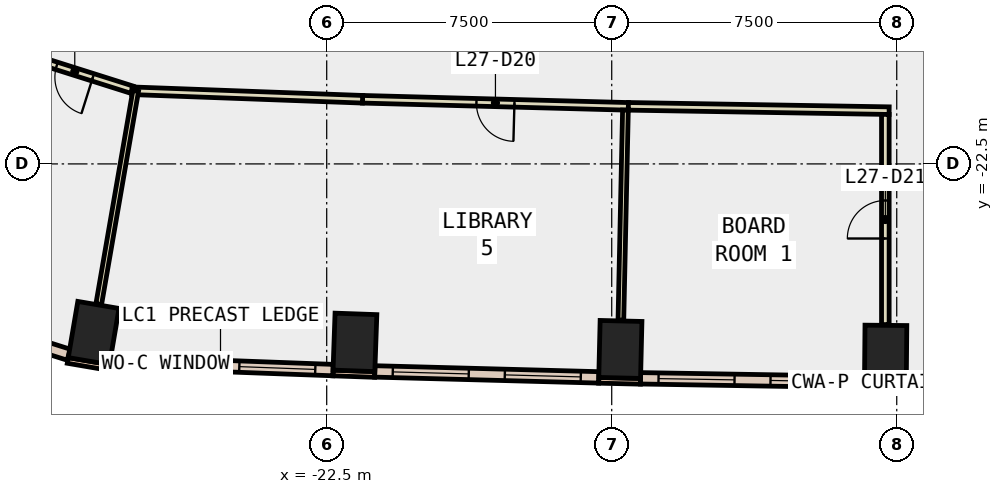
"""IFC4 building model, lengths in metres.
Left out: names, types, materials, properties, quantities, classifications, styles, units other than length and angle.
Written with IfcOpenShell. Run it as: python <this file> out.ifc"""

import sys

from ifc_helpers import new_model, si_unit, direction, frame, frame_2d, origin, origin_2d, place, context, subcontext, project, spatial, rectangle, extrude, element, fill, save


model = new_model("IFC4")
c1 = context("Model", 3, precision=1e-05, world=origin(), true_north=direction((0.0, 1.0)))
c2 = subcontext(c1, "Body", "Model", "MODEL_VIEW")
j1 = project(units=[si_unit("LENGTHUNIT", "METRE"), si_unit("PLANEANGLEUNIT", "RADIAN")], contexts=[c1])
p1 = place(None, origin())
s1 = spatial("IfcSite", under=j1, at=p1, CompositionType="ELEMENT")
p2 = place(p1, origin())
s2 = spatial("IfcBuilding", under=s1, at=p2, CompositionType="ELEMENT")
p3 = place(p2, frame((0.0, 0.0, 124.4)))
s3 = spatial("IfcBuildingStorey", under=s2, at=p3, CompositionType="ELEMENT", Elevation=124.4)
for number, where, z_axis, x_axis in (
    (1, (-28.633, -26.95, -0.4), (0.0, 0.0, 1.0), (-0.986, 0.168, 0.0)),
    (2, (-21.757, -27.196, -0.4), (0.0, 0.0, 1.0), (-0.999, 0.035, 0.0)),
    (3, (-14.773, -27.382, -0.4), (0.0, 0.0, 1.0), (-1.0, 0.024, 0.0)),
    (4, (-7.792, -27.498, -0.4), (0.0, 0.0, 1.0), (-1.0, 0.009, 0.0)),
):
    element("IfcColumn", number, at=place(p3, frame(where, z_axis=z_axis, x_axis=x_axis)), inside=s3, PredefinedType="COLUMN", context=c2, shape_type="SweptSolid", body=[
        extrude(rectangle(XDim=1.1, YDim=1.5, at=origin_2d()), origin(), (0.0, 0.0, 1.0), 4.2),
    ])
p4 = place(p3, frame((-29.314, -27.671, 0.0), z_axis=(0.0, 0.0, 1.0), x_axis=(0.985763338892, -0.168138751323, 0.0)))
e5 = element("IfcWall", 5, at=p4, inside=s3, PredefinedType="STANDARD", context=c2, shape_type="SweptSolid", body=[
    extrude(rectangle(XDim=1.101, YDim=0.15, at=frame_2d((0.55, 0.0))), origin(), (0.0, 0.0, 1.0), 3.8),
])
p5 = place(p3, frame((-22.336, -28.001, 0.0), z_axis=(0.0, 0.0, 1.0), x_axis=(0.999368780235, -0.035525217693, 0.0)))
e6 = element("IfcWall", 6, at=p5, inside=s3, PredefinedType="STANDARD", context=c2, shape_type="SweptSolid", body=[
    extrude(rectangle(XDim=1.1, YDim=0.15, at=frame_2d((0.55, 0.0))), origin(), (0.0, 0.0, 1.0), 3.8),
])
p6 = place(p3, frame((-15.343, -28.194, 0.0), z_axis=(0.0, 0.0, 1.0), x_axis=(0.999723421029, -0.023517683673, 0.0)))
e7 = element("IfcWall", 7, at=p6, inside=s3, PredefinedType="STANDARD", context=c2, shape_type="SweptSolid", body=[
    extrude(rectangle(XDim=1.1, YDim=0.15, at=frame_2d((0.55, 0.0))), origin(), (0.0, 0.0, 1.0), 3.8),
])
p7 = place(p3, frame((-8.349, -28.318, 0.0), z_axis=(0.0, 0.0, 1.0), x_axis=(0.999960601295, -0.008876703074, 0.0)))
e8 = element("IfcWall", 8, at=p7, inside=s3, PredefinedType="STANDARD", context=c2, shape_type="SweptSolid", body=[
    extrude(rectangle(XDim=1.1, YDim=0.15, at=frame_2d((0.55, 0.0))), origin(), (0.0, 0.0, 1.0), 3.8),
])
p8 = place(p3, frame((-28.205, -27.708, 0.0), z_axis=(0.0, 0.0, 1.0), x_axis=(0.999317846462, -0.036930228031, 0.0)))
e9 = element("IfcWall", 9, at=p8, inside=s3, PredefinedType="STANDARD", context=c2, shape_type="SweptSolid", body=[
    extrude(rectangle(XDim=5.877, YDim=0.3, at=frame_2d((2.938, 0.0))), origin(), (0.0, 0.0, 1.0), 3.8),
])
p9 = place(p8, frame((0.469, 0.0, 0.9)))
e10 = element("IfcOpeningElement", 10, at=p9, cuts=e9, PredefinedType="OPENING", context=c2, shape_type="SweptSolid", body=[
    extrude(rectangle(XDim=2.0, YDim=2.6, at=frame_2d((1.0, 1.3))), frame((0.0, 0.16, 0.0), z_axis=(0.0, -1.0, 0.0), x_axis=(1.0, 0.0, 0.0)), (0.0, 0.0, 1.0), 0.32),
])
p10 = place(p8, frame((3.408, 0.0, 0.9)))
e11 = element("IfcOpeningElement", 11, at=p10, cuts=e9, PredefinedType="OPENING", context=c2, shape_type="SweptSolid", body=[
    extrude(rectangle(XDim=2.0, YDim=2.6, at=frame_2d((1.0, 1.3))), frame((0.0, 0.16, 0.0), z_axis=(0.0, -1.0, 0.0), x_axis=(1.0, 0.0, 0.0)), (0.0, 0.0, 1.0), 0.32),
])
p11 = place(p3, frame((-21.235, -27.96, 0.0), z_axis=(0.0, 0.0, 1.0), x_axis=(0.999645618819, -0.026620232457, 0.0)))
e12 = element("IfcWall", 12, at=p11, inside=s3, PredefinedType="STANDARD", context=c2, shape_type="SweptSolid", body=[
    extrude(rectangle(XDim=5.897, YDim=0.3, at=frame_2d((2.949, 0.0))), origin(), (0.0, 0.0, 1.0), 3.8),
])
p12 = place(p11, frame((0.474, 0.0, 0.9)))
e13 = element("IfcOpeningElement", 13, at=p12, cuts=e12, PredefinedType="OPENING", context=c2, shape_type="SweptSolid", body=[
    extrude(rectangle(XDim=2.0, YDim=2.6, at=frame_2d((1.0, 1.3))), frame((0.0, 0.16, 0.0), z_axis=(0.0, -1.0, 0.0), x_axis=(1.0, 0.0, 0.0)), (0.0, 0.0, 1.0), 0.32),
])
p13 = place(p11, frame((3.423, 0.0, 0.9)))
e14 = element("IfcOpeningElement", 14, at=p13, cuts=e12, PredefinedType="OPENING", context=c2, shape_type="SweptSolid", body=[
    extrude(rectangle(XDim=2.0, YDim=2.6, at=frame_2d((1.0, 1.3))), frame((0.0, 0.16, 0.0), z_axis=(0.0, -1.0, 0.0), x_axis=(1.0, 0.0, 0.0)), (0.0, 0.0, 1.0), 0.32),
])
p14 = place(p3, frame((-14.242, -28.141, 0.0), z_axis=(0.0, 0.0, 1.0), x_axis=(0.999862081538, -0.016607766328, 0.0)))
e15 = element("IfcWall", 15, at=p14, inside=s3, PredefinedType="STANDARD", context=c2, shape_type="SweptSolid", body=[
    extrude(rectangle(XDim=5.895, YDim=0.3, at=frame_2d((2.947, 0.0))), origin(), (0.0, 0.0, 1.0), 3.8),
])
p15 = place(p14, frame((0.474, 0.0, 0.9)))
e16 = element("IfcOpeningElement", 16, at=p15, cuts=e15, PredefinedType="OPENING", context=c2, shape_type="SweptSolid", body=[
    extrude(rectangle(XDim=2.0, YDim=2.6, at=frame_2d((1.0, 1.3))), frame((0.0, 0.16, 0.0), z_axis=(0.0, -1.0, 0.0), x_axis=(1.0, 0.0, 0.0)), (0.0, 0.0, 1.0), 0.32),
])
p16 = place(p14, frame((3.421, 0.0, 0.9)))
e17 = element("IfcOpeningElement", 17, at=p16, cuts=e15, PredefinedType="OPENING", context=c2, shape_type="SweptSolid", body=[
    extrude(rectangle(XDim=2.0, YDim=2.6, at=frame_2d((1.0, 1.3))), frame((0.0, 0.16, 0.0), z_axis=(0.0, -1.0, 0.0), x_axis=(1.0, 0.0, 0.0)), (0.0, 0.0, 1.0), 0.32),
])
p17 = place(p3, frame((-33.657, -26.139, 0.0), z_axis=(0.0, 0.0, 1.0), x_axis=(0.953449736988, -0.301551983971, 0.0)))
e18 = element("IfcWall", 18, at=p17, inside=s3, PredefinedType="STANDARD", context=c2, shape_type="SweptSolid", body=[
    extrude(rectangle(XDim=4.583, YDim=0.3, at=frame_2d((2.292, 0.0))), origin(), (0.0, 0.0, 1.0), 3.8),
])
p18 = place(p17, frame((1.592, 0.0, 0.9)))
e19 = element("IfcOpeningElement", 19, at=p18, cuts=e18, PredefinedType="OPENING", context=c2, shape_type="SweptSolid", body=[
    extrude(rectangle(XDim=1.4, YDim=2.6, at=frame_2d((0.7, 1.3))), frame((0.0, 0.16, 0.0), z_axis=(0.0, -1.0, 0.0), x_axis=(1.0, 0.0, 0.0)), (0.0, 0.0, 1.0), 0.32),
])
p19 = place(p3, frame((-27.621, -20.548, 0.0), z_axis=(0.0, 0.0, 1.0), x_axis=(-0.953482354465, 0.301448834338, 0.0)))
e20 = element("IfcWall", 20, at=p19, inside=s3, PredefinedType="PARTITIONING", context=c2, shape_type="SweptSolid", body=[
    extrude(rectangle(XDim=3.165, YDim=0.2, at=frame_2d((1.583, 0.0))), origin(), (0.0, 0.0, 1.0), 3.8),
])
p20 = place(p19, frame((1.082, 0.0, 0.0)))
e21 = element("IfcOpeningElement", 21, at=p20, cuts=e20, PredefinedType="OPENING", context=c2, shape_type="SweptSolid", body=[
    extrude(rectangle(XDim=1.0, YDim=2.1, at=frame_2d((0.5, 1.05))), frame((0.0, 0.11, 0.0), z_axis=(0.0, -1.0, 0.0), x_axis=(1.0, 0.0, 0.0)), (0.0, 0.0, 1.0), 0.22),
])
p21 = place(p3, frame((-14.562, -20.986, 0.0), z_axis=(0.0, 0.0, 1.0), x_axis=(-0.999642796892, 0.026725991498, 0.0)))
e22 = element("IfcWall", 22, at=p21, inside=s3, PredefinedType="PARTITIONING", context=c2, shape_type="SweptSolid", body=[
    extrude(rectangle(XDim=6.997, YDim=0.2, at=frame_2d((3.499, 0.0))), origin(), (0.0, 0.0, 1.0), 3.8),
])
p22 = place(p21, frame((2.999, 0.0, 0.0)))
e23 = element("IfcOpeningElement", 23, at=p22, cuts=e22, PredefinedType="OPENING", context=c2, shape_type="SweptSolid", body=[
    extrude(rectangle(XDim=1.0, YDim=2.1, at=frame_2d((0.5, 1.05))), frame((0.0, 0.11, 0.0), z_axis=(0.0, -1.0, 0.0), x_axis=(1.0, 0.0, 0.0)), (0.0, 0.0, 1.0), 0.22),
])
p23 = place(p3, frame((-21.557, -20.799, 0.0), z_axis=(0.0, 0.0, 1.0), x_axis=(-0.99931884782, 0.036903121698, 0.0)))
e24 = element("IfcWall", 24, at=p23, inside=s3, PredefinedType="PARTITIONING", context=c2, shape_type="SweptSolid", body=[
    extrude(rectangle(XDim=6.073, YDim=0.2, at=frame_2d((3.037, 0.0))), origin(), (0.0, 0.0, 1.0), 3.8),
])
p24 = place(p3, frame((-7.7, -21.099, 0.0), z_axis=(0.0, 0.0, 1.0), x_axis=(-0.999861998162, 0.016612785183, 0.0)))
e25 = element("IfcWall", 25, at=p24, inside=s3, PredefinedType="PARTITIONING", context=c2, shape_type="SweptSolid", body=[
    extrude(rectangle(XDim=6.863, YDim=0.2, at=frame_2d((3.432, 0.0))), origin(), (0.0, 0.0, 1.0), 3.8),
])
p25 = place(p3, frame((-7.8, -26.728, 0.0), z_axis=(0.0, 0.0, 1.0), x_axis=(0.0, 1.0, 0.0)))
e26 = element("IfcWall", 26, at=p25, inside=s3, PredefinedType="PARTITIONING", context=c2, shape_type="SweptSolid", body=[
    extrude(rectangle(XDim=5.531, YDim=0.2, at=frame_2d((2.766, 0.0))), origin(), (0.0, 0.0, 1.0), 3.8),
])
p26 = place(p25, frame((2.265, 0.0, 0.0)))
e27 = element("IfcOpeningElement", 27, at=p26, cuts=e26, PredefinedType="OPENING", context=c2, shape_type="SweptSolid", body=[
    extrude(rectangle(XDim=1.0, YDim=2.1, at=frame_2d((0.5, 1.05))), frame((0.0, 0.11, 0.0), z_axis=(0.0, -1.0, 0.0), x_axis=(1.0, 0.0, 0.0)), (0.0, 0.0, 1.0), 0.22),
])
p27 = place(p3, frame((-27.526, -20.578, 0.0), z_axis=(0.0, 0.0, 1.0), x_axis=(-0.170795043313, -0.985306578269, 0.0)))
e28 = element("IfcWall", 28, at=p27, inside=s3, PredefinedType="PARTITIONING", context=c2, shape_type="SweptSolid", body=[
    extrude(rectangle(XDim=5.698, YDim=0.15, at=frame_2d((2.849, 0.0))), origin(), (0.0, 0.0, 1.0), 3.8),
])
p28 = place(p3, frame((-14.639, -21.084, 0.0), z_axis=(0.0, 0.0, 1.0), x_axis=(-0.021723441989, -0.99976401819, 0.0)))
e29 = element("IfcWall", 29, at=p28, inside=s3, PredefinedType="PARTITIONING", context=c2, shape_type="SweptSolid", body=[
    extrude(rectangle(XDim=5.529, YDim=0.15, at=frame_2d((2.765, 0.0))), origin(), (0.0, 0.0, 1.0), 3.8),
])
p29 = place(p9, origin())
e30 = element("IfcWindow", 30, at=p29, inside=s3, PartitioningType="SINGLE_PANEL", PredefinedType="WINDOW", context=c2, shape_type="SweptSolid", body=[
    extrude(rectangle(XDim=2.0, YDim=2.6, at=frame_2d((1.0, 1.3))), frame((0.0, 0.03, 0.0), z_axis=(0.0, -1.0, 0.0), x_axis=(1.0, 0.0, 0.0)), (0.0, 0.0, 1.0), 0.06),
])
fill(e10, e30)
p30 = place(p10, origin())
e31 = element("IfcWindow", 31, at=p30, inside=s3, PartitioningType="SINGLE_PANEL", PredefinedType="WINDOW", context=c2, shape_type="SweptSolid", body=[
    extrude(rectangle(XDim=2.0, YDim=2.6, at=frame_2d((1.0, 1.3))), frame((0.0, 0.03, 0.0), z_axis=(0.0, -1.0, 0.0), x_axis=(1.0, 0.0, 0.0)), (0.0, 0.0, 1.0), 0.06),
])
fill(e11, e31)
p31 = place(p12, origin())
e32 = element("IfcWindow", 32, at=p31, inside=s3, PartitioningType="SINGLE_PANEL", PredefinedType="WINDOW", context=c2, shape_type="SweptSolid", body=[
    extrude(rectangle(XDim=2.0, YDim=2.6, at=frame_2d((1.0, 1.3))), frame((0.0, 0.03, 0.0), z_axis=(0.0, -1.0, 0.0), x_axis=(1.0, 0.0, 0.0)), (0.0, 0.0, 1.0), 0.06),
])
fill(e13, e32)
p32 = place(p13, origin())
e33 = element("IfcWindow", 33, at=p32, inside=s3, PartitioningType="SINGLE_PANEL", PredefinedType="WINDOW", context=c2, shape_type="SweptSolid", body=[
    extrude(rectangle(XDim=2.0, YDim=2.6, at=frame_2d((1.0, 1.3))), frame((0.0, 0.03, 0.0), z_axis=(0.0, -1.0, 0.0), x_axis=(1.0, 0.0, 0.0)), (0.0, 0.0, 1.0), 0.06),
])
fill(e14, e33)
p33 = place(p15, origin())
e34 = element("IfcWindow", 34, at=p33, inside=s3, PartitioningType="SINGLE_PANEL", PredefinedType="WINDOW", context=c2, shape_type="SweptSolid", body=[
    extrude(rectangle(XDim=2.0, YDim=2.6, at=frame_2d((1.0, 1.3))), frame((0.0, 0.03, 0.0), z_axis=(0.0, -1.0, 0.0), x_axis=(1.0, 0.0, 0.0)), (0.0, 0.0, 1.0), 0.06),
])
fill(e16, e34)
p34 = place(p16, origin())
e35 = element("IfcWindow", 35, at=p34, inside=s3, PartitioningType="SINGLE_PANEL", PredefinedType="WINDOW", context=c2, shape_type="SweptSolid", body=[
    extrude(rectangle(XDim=2.0, YDim=2.6, at=frame_2d((1.0, 1.3))), frame((0.0, 0.03, 0.0), z_axis=(0.0, -1.0, 0.0), x_axis=(1.0, 0.0, 0.0)), (0.0, 0.0, 1.0), 0.06),
])
fill(e17, e35)
p35 = place(p20, origin())
e36 = element("IfcDoor", 36, at=p35, inside=s3, OperationType="SINGLE_SWING_RIGHT", PredefinedType="DOOR", context=c2, shape_type="SweptSolid", body=[
    extrude(rectangle(XDim=1.0, YDim=2.1, at=frame_2d((0.5, 1.05))), frame((0.0, 0.025, 0.0), z_axis=(0.0, -1.0, 0.0), x_axis=(1.0, 0.0, 0.0)), (0.0, 0.0, 1.0), 0.05),
])
fill(e21, e36)
p36 = place(p22, origin())
e37 = element("IfcDoor", 37, at=p36, inside=s3, OperationType="SINGLE_SWING_LEFT", PredefinedType="DOOR", context=c2, shape_type="SweptSolid", body=[
    extrude(rectangle(XDim=1.0, YDim=2.1, at=frame_2d((0.5, 1.05))), frame((0.0, 0.025, 0.0), z_axis=(0.0, -1.0, 0.0), x_axis=(1.0, 0.0, 0.0)), (0.0, 0.0, 1.0), 0.05),
])
fill(e23, e37)
p37 = place(p26, origin())
e38 = element("IfcDoor", 38, at=p37, inside=s3, OperationType="SINGLE_SWING_LEFT", PredefinedType="DOOR", context=c2, shape_type="SweptSolid", body=[
    extrude(rectangle(XDim=1.0, YDim=2.1, at=frame_2d((0.5, 1.05))), frame((0.0, 0.025, 0.0), z_axis=(0.0, -1.0, 0.0), x_axis=(1.0, 0.0, 0.0)), (0.0, 0.0, 1.0), 0.05),
])
fill(e27, e38)
save(model, sys.argv[1])
